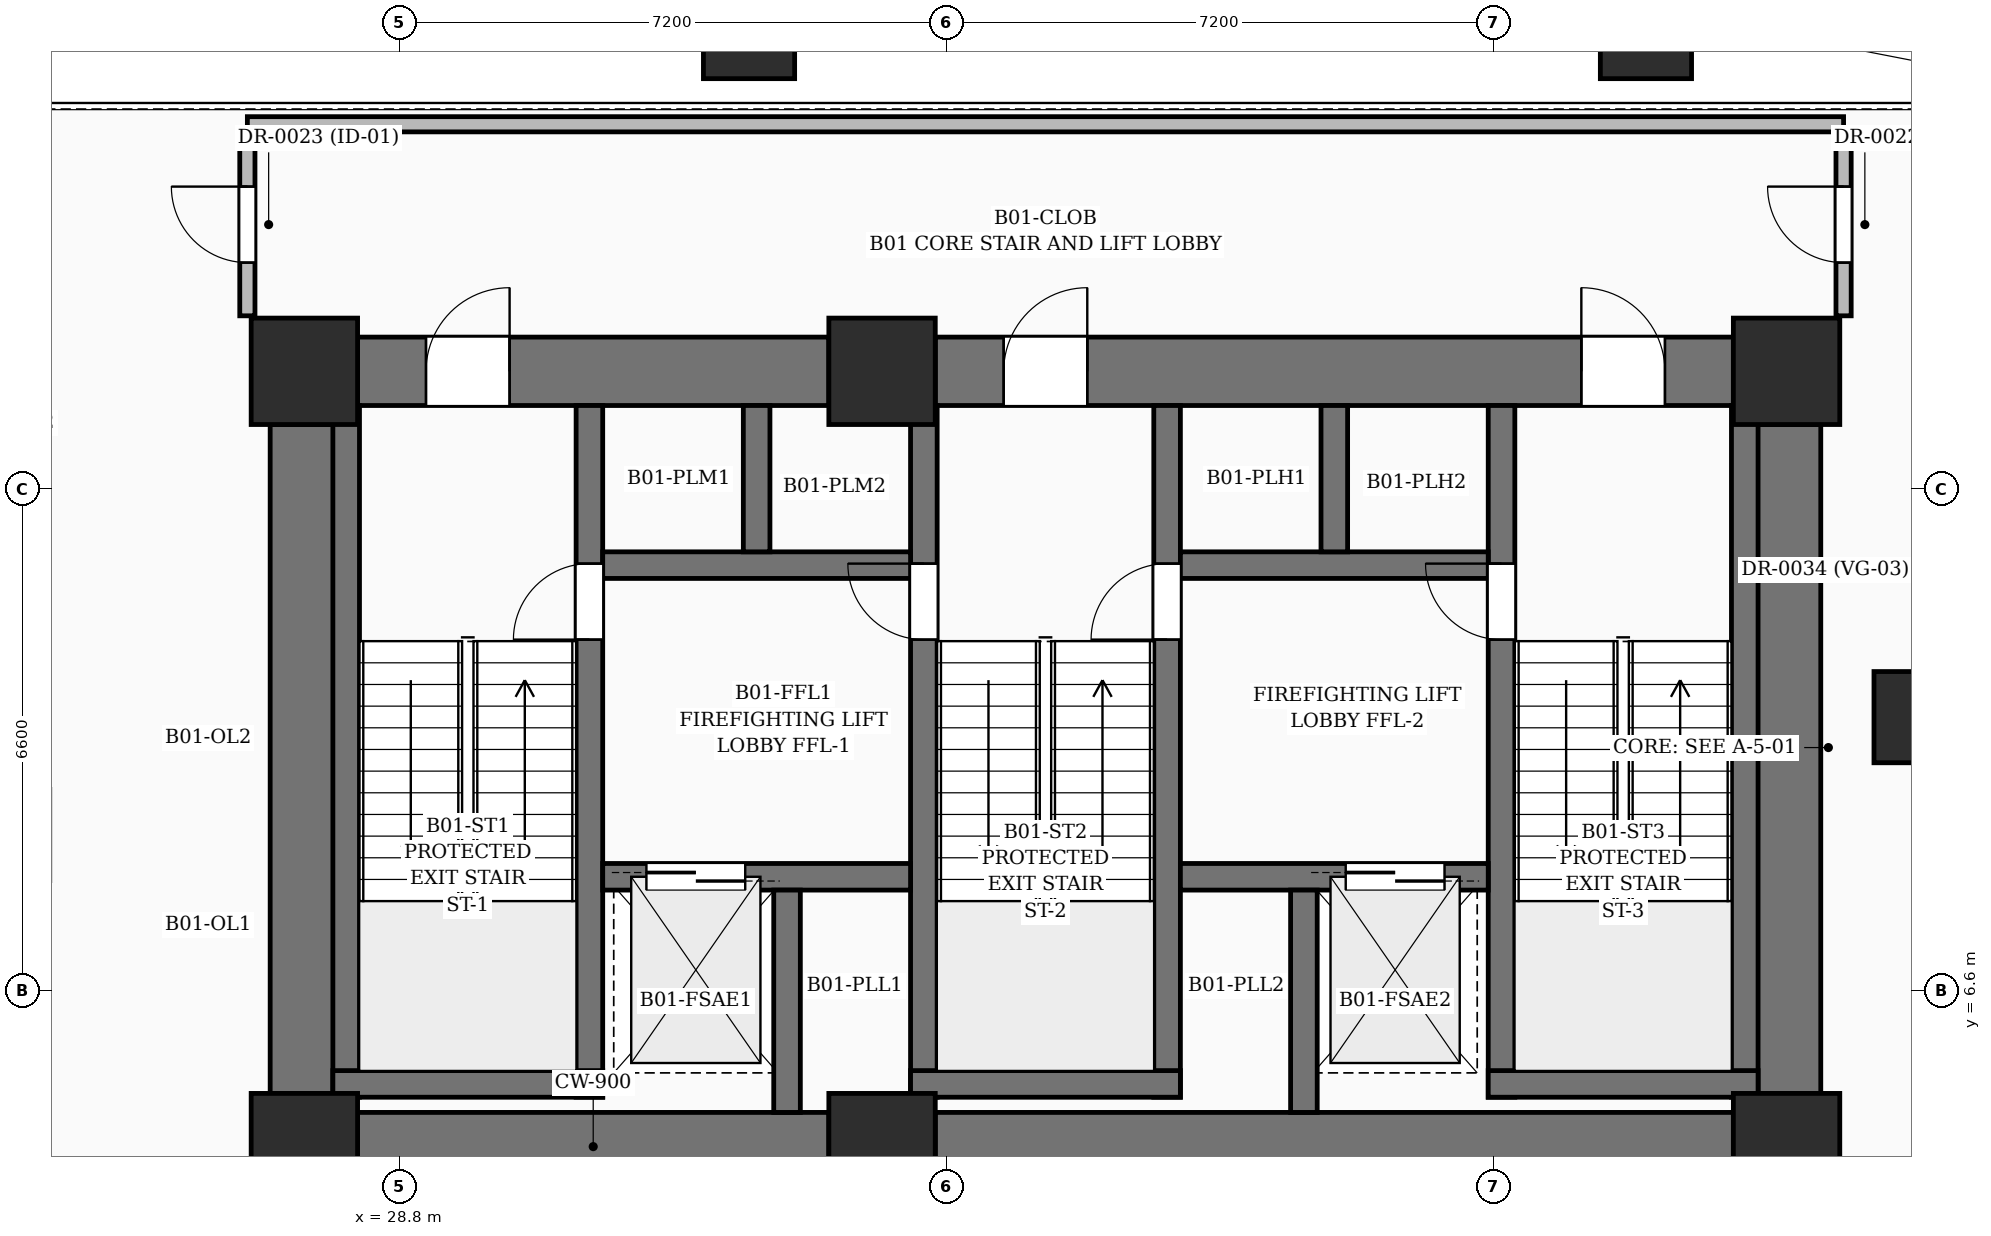
"""IFC4 building model, lengths in metres.
Left out: names, types, materials, properties, quantities, classifications, styles, units other than length and angle.
Written with IfcOpenShell. Run it as: python <this file> out.ifc"""

import sys

from ifc_helpers import new_model, si_unit, direction, frame, frame_2d, origin, origin_2d, place, context, subcontext, project, spatial, rectangle, extrude, element, fill, save


model = new_model("IFC4")
c1 = context("Model", 3, precision=1e-05, world=origin(), true_north=direction((0.0, 1.0)))
c2 = subcontext(c1, "Body", "Model", "MODEL_VIEW")
j1 = project(units=[si_unit("LENGTHUNIT", "METRE"), si_unit("PLANEANGLEUNIT", "RADIAN")], contexts=[c1])
p1 = place(None, origin())
s1 = spatial("IfcSite", under=j1, at=p1, CompositionType="ELEMENT")
p2 = place(p1, origin())
s2 = spatial("IfcBuilding", under=s1, at=p2, CompositionType="ELEMENT")
p3 = place(p2, frame((0.0, 0.0, -4.5)))
s3 = spatial("IfcBuildingStorey", under=s2, at=p3, CompositionType="ELEMENT", Elevation=-4.5)
for number, where, z_axis, x_axis in (
    (1, (27.55, 4.55, 0.0), (0.0, 0.0, 1.0), (1.0, 0.0, 0.0)),
    (2, (35.15, 4.55, 0.0), (0.0, 0.0, 1.0), (1.0, 0.0, 0.0)),
    (3, (47.05, 4.55, 0.0), (0.0, 0.0, 1.0), (1.0, 0.0, 0.0)),
    (4, (27.55, 14.75, 0.0), (0.0, 0.0, 1.0), (1.0, 0.0, 0.0)),
    (5, (35.15, 14.75, 0.0), (0.0, 0.0, 1.0), (1.0, 0.0, 0.0)),
    (6, (47.05, 14.75, 0.0), (0.0, 0.0, 1.0), (1.0, 0.0, 0.0)),
):
    element("IfcColumn", number, at=place(p3, frame(where, z_axis=z_axis, x_axis=x_axis)), inside=s3, PredefinedType="COLUMN", context=c2, shape_type="SweptSolid", body=[
        extrude(rectangle(XDim=1.4, YDim=1.4, at=origin_2d()), origin(), (0.0, 0.0, 1.0), 4.5),
    ])
for number, where, z_axis, x_axis in (
    (7, (48.8, 10.2, 0.0), (0.0, 0.0, 1.0), (1.0, 0.0, 0.0)),
    (8, (45.2, 19.2, 0.0), (0.0, 0.0, 1.0), (1.0, 0.0, 0.0)),
    (9, (33.4, 19.2, 0.0), (0.0, 0.0, 1.0), (1.0, 0.0, 0.0)),
):
    element("IfcColumn", number, at=place(p3, frame(where, z_axis=z_axis, x_axis=x_axis)), inside=s3, PredefinedType="COLUMN", context=c2, shape_type="SweptSolid", body=[
        extrude(rectangle(XDim=1.2, YDim=1.2, at=origin_2d()), origin(), (0.0, 0.0, 1.0), 4.5),
    ])
p4 = place(p3, frame((28.25, 4.55, 0.0), z_axis=(0.0, 0.0, 1.0), x_axis=(1.0, 0.0, 0.0)))
e10 = element("IfcWall", 10, at=p4, inside=s3, PredefinedType="SHEAR", context=c2, shape_type="SweptSolid", body=[
    extrude(rectangle(XDim=6.2, YDim=0.9, at=frame_2d((3.1, 0.0))), origin(), (0.0, 0.0, 1.0), 4.5),
])
p5 = place(p3, frame((35.85, 4.55, 0.0), z_axis=(0.0, 0.0, 1.0), x_axis=(1.0, 0.0, 0.0)))
e11 = element("IfcWall", 11, at=p5, inside=s3, PredefinedType="SHEAR", context=c2, shape_type="SweptSolid", body=[
    extrude(rectangle(XDim=10.5, YDim=0.9, at=frame_2d((5.25, 0.0))), origin(), (0.0, 0.0, 1.0), 4.5),
])
p6 = place(p3, frame((28.25, 14.75, 0.0), z_axis=(0.0, 0.0, 1.0), x_axis=(1.0, 0.0, 0.0)))
e12 = element("IfcWall", 12, at=p6, inside=s3, PredefinedType="SHEAR", context=c2, shape_type="SweptSolid", body=[
    extrude(rectangle(XDim=6.2, YDim=0.9, at=frame_2d((3.1, 0.0))), origin(), (0.0, 0.0, 1.0), 4.5),
])
p7 = place(p6, frame((0.9, 0.0, 0.0)))
e13 = element("IfcOpeningElement", 13, at=p7, cuts=e12, PredefinedType="OPENING", context=c2, shape_type="SweptSolid", body=[
    extrude(rectangle(XDim=1.1, YDim=2.2, at=frame_2d((0.55, 1.1))), frame((0.0, 0.46, 0.0), z_axis=(0.0, -1.0, 0.0), x_axis=(1.0, 0.0, 0.0)), (0.0, 0.0, 1.0), 0.92),
])
p8 = place(p3, frame((35.85, 14.75, 0.0), z_axis=(0.0, 0.0, 1.0), x_axis=(1.0, 0.0, 0.0)))
e14 = element("IfcWall", 14, at=p8, inside=s3, PredefinedType="SHEAR", context=c2, shape_type="SweptSolid", body=[
    extrude(rectangle(XDim=10.5, YDim=0.9, at=frame_2d((5.25, 0.0))), origin(), (0.0, 0.0, 1.0), 4.5),
])
p9 = place(p8, frame((0.9, 0.0, 0.0)))
e15 = element("IfcOpeningElement", 15, at=p9, cuts=e14, PredefinedType="OPENING", context=c2, shape_type="SweptSolid", body=[
    extrude(rectangle(XDim=1.1, YDim=2.2, at=frame_2d((0.55, 1.1))), frame((0.0, 0.46, 0.0), z_axis=(0.0, -1.0, 0.0), x_axis=(1.0, 0.0, 0.0)), (0.0, 0.0, 1.0), 0.92),
])
p10 = place(p8, frame((8.5, 0.0, 0.0)))
e16 = element("IfcOpeningElement", 16, at=p10, cuts=e14, PredefinedType="OPENING", context=c2, shape_type="SweptSolid", body=[
    extrude(rectangle(XDim=1.1, YDim=2.2, at=frame_2d((0.55, 1.1))), frame((0.0, 0.46, 0.0), z_axis=(0.0, -1.0, 0.0), x_axis=(1.0, 0.0, 0.0)), (0.0, 0.0, 1.0), 0.92),
])
for number, where, z_axis, x_axis in (
    (17, (27.55, 5.25, 0.0), (0.0, 0.0, 1.0), (0.0, 1.0, 0.0)),
    (18, (47.05, 5.25, 0.0), (0.0, 0.0, 1.0), (0.0, 1.0, 0.0)),
):
    element("IfcWall", number, at=place(p3, frame(where, z_axis=z_axis, x_axis=x_axis)), inside=s3, PredefinedType="SHEAR", context=c2, shape_type="SweptSolid", body=[
        extrude(rectangle(XDim=8.8, YDim=0.9, at=frame_2d((4.4, 0.0))), origin(), (0.0, 0.0, 1.0), 4.5),
    ])
p11 = place(p3, frame((28.1, 5.2, 0.0), z_axis=(0.0, 0.0, 1.0), x_axis=(0.0, 1.0, 0.0)))
e19 = element("IfcWall", 19, at=p11, inside=s3, PredefinedType="SOLIDWALL", context=c2, shape_type="SweptSolid", body=[
    extrude(rectangle(XDim=9.1, YDim=0.35, at=frame_2d((4.55, 0.0))), origin(), (0.0, 0.0, 1.0), 4.5),
])
p12 = place(p3, frame((31.3, 5.2, 0.0), z_axis=(0.0, 0.0, 1.0), x_axis=(0.0, 1.0, 0.0)))
e20 = element("IfcWall", 20, at=p12, inside=s3, PredefinedType="SOLIDWALL", context=c2, shape_type="SweptSolid", body=[
    extrude(rectangle(XDim=9.1, YDim=0.35, at=frame_2d((4.55, 0.0))), origin(), (0.0, 0.0, 1.0), 4.5),
])
p13 = place(p12, frame((6.02, 0.0, 0.0)))
e21 = element("IfcOpeningElement", 21, at=p13, cuts=e20, PredefinedType="OPENING", context=c2, shape_type="SweptSolid", body=[
    extrude(rectangle(XDim=1.0, YDim=2.15, at=frame_2d((0.5, 1.075))), frame((0.0, 0.185, 0.0), z_axis=(0.0, -1.0, 0.0), x_axis=(1.0, 0.0, 0.0)), (0.0, 0.0, 1.0), 0.37),
])
p14 = place(p3, frame((27.925, 5.375, 0.0), z_axis=(0.0, 0.0, 1.0), x_axis=(1.0, 0.0, 0.0)))
e22 = element("IfcWall", 22, at=p14, inside=s3, PredefinedType="SOLIDWALL", context=c2, shape_type="SweptSolid", body=[
    extrude(rectangle(XDim=3.55, YDim=0.35, at=frame_2d((1.775, 0.0))), origin(), (0.0, 0.0, 1.0), 4.5),
])
p15 = place(p3, frame((35.7, 5.2, 0.0), z_axis=(0.0, 0.0, 1.0), x_axis=(0.0, 1.0, 0.0)))
e23 = element("IfcWall", 23, at=p15, inside=s3, PredefinedType="SOLIDWALL", context=c2, shape_type="SweptSolid", body=[
    extrude(rectangle(XDim=9.1, YDim=0.35, at=frame_2d((4.55, 0.0))), origin(), (0.0, 0.0, 1.0), 4.5),
])
p16 = place(p15, frame((6.02, 0.0, 0.0)))
e24 = element("IfcOpeningElement", 24, at=p16, cuts=e23, PredefinedType="OPENING", context=c2, shape_type="SweptSolid", body=[
    extrude(rectangle(XDim=1.0, YDim=2.15, at=frame_2d((0.5, 1.075))), frame((0.0, 0.185, 0.0), z_axis=(0.0, -1.0, 0.0), x_axis=(1.0, 0.0, 0.0)), (0.0, 0.0, 1.0), 0.37),
])
p17 = place(p3, frame((38.9, 5.2, 0.0), z_axis=(0.0, 0.0, 1.0), x_axis=(0.0, 1.0, 0.0)))
e25 = element("IfcWall", 25, at=p17, inside=s3, PredefinedType="SOLIDWALL", context=c2, shape_type="SweptSolid", body=[
    extrude(rectangle(XDim=9.1, YDim=0.35, at=frame_2d((4.55, 0.0))), origin(), (0.0, 0.0, 1.0), 4.5),
])
p18 = place(p17, frame((6.02, 0.0, 0.0)))
e26 = element("IfcOpeningElement", 26, at=p18, cuts=e25, PredefinedType="OPENING", context=c2, shape_type="SweptSolid", body=[
    extrude(rectangle(XDim=1.0, YDim=2.15, at=frame_2d((0.5, 1.075))), frame((0.0, 0.185, 0.0), z_axis=(0.0, -1.0, 0.0), x_axis=(1.0, 0.0, 0.0)), (0.0, 0.0, 1.0), 0.37),
])
p19 = place(p3, frame((35.525, 5.375, 0.0), z_axis=(0.0, 0.0, 1.0), x_axis=(1.0, 0.0, 0.0)))
e27 = element("IfcWall", 27, at=p19, inside=s3, PredefinedType="SOLIDWALL", context=c2, shape_type="SweptSolid", body=[
    extrude(rectangle(XDim=3.55, YDim=0.35, at=frame_2d((1.775, 0.0))), origin(), (0.0, 0.0, 1.0), 4.5),
])
p20 = place(p3, frame((43.3, 5.2, 0.0), z_axis=(0.0, 0.0, 1.0), x_axis=(0.0, 1.0, 0.0)))
e28 = element("IfcWall", 28, at=p20, inside=s3, PredefinedType="SOLIDWALL", context=c2, shape_type="SweptSolid", body=[
    extrude(rectangle(XDim=9.1, YDim=0.35, at=frame_2d((4.55, 0.0))), origin(), (0.0, 0.0, 1.0), 4.5),
])
p21 = place(p20, frame((6.02, 0.0, 0.0)))
e29 = element("IfcOpeningElement", 29, at=p21, cuts=e28, PredefinedType="OPENING", context=c2, shape_type="SweptSolid", body=[
    extrude(rectangle(XDim=1.0, YDim=2.15, at=frame_2d((0.5, 1.075))), frame((0.0, 0.185, 0.0), z_axis=(0.0, -1.0, 0.0), x_axis=(1.0, 0.0, 0.0)), (0.0, 0.0, 1.0), 0.37),
])
p22 = place(p3, frame((46.5, 5.2, 0.0), z_axis=(0.0, 0.0, 1.0), x_axis=(0.0, 1.0, 0.0)))
e30 = element("IfcWall", 30, at=p22, inside=s3, PredefinedType="SOLIDWALL", context=c2, shape_type="SweptSolid", body=[
    extrude(rectangle(XDim=9.1, YDim=0.35, at=frame_2d((4.55, 0.0))), origin(), (0.0, 0.0, 1.0), 4.5),
])
p23 = place(p3, frame((43.125, 5.375, 0.0), z_axis=(0.0, 0.0, 1.0), x_axis=(1.0, 0.0, 0.0)))
e31 = element("IfcWall", 31, at=p23, inside=s3, PredefinedType="SOLIDWALL", context=c2, shape_type="SweptSolid", body=[
    extrude(rectangle(XDim=3.55, YDim=0.35, at=frame_2d((1.775, 0.0))), origin(), (0.0, 0.0, 1.0), 4.5),
])
p24 = place(p3, frame((31.475, 8.1, 0.0), z_axis=(0.0, 0.0, 1.0), x_axis=(1.0, 0.0, 0.0)))
e32 = element("IfcWall", 32, at=p24, inside=s3, PredefinedType="SOLIDWALL", context=c2, shape_type="SweptSolid", body=[
    extrude(rectangle(XDim=4.05, YDim=0.35, at=frame_2d((2.025, 0.0))), origin(), (0.0, 0.0, 1.0), 4.5),
])
p25 = place(p24, frame((0.575, 0.0, 0.0)))
e33 = element("IfcOpeningElement", 33, at=p25, cuts=e32, PredefinedType="OPENING", context=c2, shape_type="SweptSolid", body=[
    extrude(rectangle(XDim=1.3, YDim=2.25, at=frame_2d((0.65, 1.125))), frame((0.0, 0.185, 0.0), z_axis=(0.0, -1.0, 0.0), x_axis=(1.0, 0.0, 0.0)), (0.0, 0.0, 1.0), 0.37),
])
p26 = place(p3, frame((39.075, 8.1, 0.0), z_axis=(0.0, 0.0, 1.0), x_axis=(1.0, 0.0, 0.0)))
e34 = element("IfcWall", 34, at=p26, inside=s3, PredefinedType="SOLIDWALL", context=c2, shape_type="SweptSolid", body=[
    extrude(rectangle(XDim=4.05, YDim=0.35, at=frame_2d((2.025, 0.0))), origin(), (0.0, 0.0, 1.0), 4.5),
])
p27 = place(p26, frame((2.175, 0.0, 0.0)))
e35 = element("IfcOpeningElement", 35, at=p27, cuts=e34, PredefinedType="OPENING", context=c2, shape_type="SweptSolid", body=[
    extrude(rectangle(XDim=1.3, YDim=2.25, at=frame_2d((0.65, 1.125))), frame((0.0, 0.185, 0.0), z_axis=(0.0, -1.0, 0.0), x_axis=(1.0, 0.0, 0.0)), (0.0, 0.0, 1.0), 0.37),
])
for number, where, z_axis, x_axis in (
    (36, (33.9, 5.0, 0.0), (0.0, 0.0, 1.0), (0.0, 1.0, 0.0)),
    (37, (40.7, 5.0, 0.0), (0.0, 0.0, 1.0), (0.0, 1.0, 0.0)),
):
    element("IfcWall", number, at=place(p3, frame(where, z_axis=z_axis, x_axis=x_axis)), inside=s3, PredefinedType="SOLIDWALL", context=c2, shape_type="SweptSolid", body=[
        extrude(rectangle(XDim=2.925, YDim=0.35, at=frame_2d((1.462, 0.0))), origin(), (0.0, 0.0, 1.0), 4.5),
    ])
p28 = place(p3, frame((31.475, 12.2, 0.0), z_axis=(0.0, 0.0, 1.0), x_axis=(1.0, 0.0, 0.0)))
e38 = element("IfcWall", 38, at=p28, inside=s3, PredefinedType="SOLIDWALL", context=c2, shape_type="SweptSolid", body=[
    extrude(rectangle(XDim=4.05, YDim=0.35, at=frame_2d((2.025, 0.0))), origin(), (0.0, 0.0, 1.0), 4.5),
])
p29 = place(p3, frame((33.5, 12.375, 0.0), z_axis=(0.0, 0.0, 1.0), x_axis=(0.0, 1.0, 0.0)))
e39 = element("IfcWall", 39, at=p29, inside=s3, PredefinedType="SOLIDWALL", context=c2, shape_type="SweptSolid", body=[
    extrude(rectangle(XDim=1.925, YDim=0.35, at=frame_2d((0.962, 0.0))), origin(), (0.0, 0.0, 1.0), 4.5),
])
p30 = place(p3, frame((39.075, 12.2, 0.0), z_axis=(0.0, 0.0, 1.0), x_axis=(1.0, 0.0, 0.0)))
e40 = element("IfcWall", 40, at=p30, inside=s3, PredefinedType="SOLIDWALL", context=c2, shape_type="SweptSolid", body=[
    extrude(rectangle(XDim=4.05, YDim=0.35, at=frame_2d((2.025, 0.0))), origin(), (0.0, 0.0, 1.0), 4.5),
])
p31 = place(p3, frame((41.1, 12.375, 0.0), z_axis=(0.0, 0.0, 1.0), x_axis=(0.0, 1.0, 0.0)))
e41 = element("IfcWall", 41, at=p31, inside=s3, PredefinedType="SOLIDWALL", context=c2, shape_type="SweptSolid", body=[
    extrude(rectangle(XDim=1.925, YDim=0.35, at=frame_2d((0.962, 0.0))), origin(), (0.0, 0.0, 1.0), 4.5),
])
p32 = place(p3, frame((26.8, 18.0, 0.0), z_axis=(0.0, 0.0, 1.0), x_axis=(1.0, 0.0, 0.0)))
e42 = element("IfcWall", 42, at=p32, inside=s3, PredefinedType="PARTITIONING", context=c2, shape_type="SweptSolid", body=[
    extrude(rectangle(XDim=21.0, YDim=0.2, at=frame_2d((10.5, 0.0))), origin(), (0.0, 0.0, 1.0), 4.2),
])
p33 = place(p3, frame((26.8, 15.48, 0.0), z_axis=(0.0, 0.0, 1.0), x_axis=(0.0, 1.0, 0.0)))
e43 = element("IfcWall", 43, at=p33, inside=s3, PredefinedType="PARTITIONING", context=c2, shape_type="SweptSolid", body=[
    extrude(rectangle(XDim=2.41, YDim=0.2, at=frame_2d((1.205, 0.0))), origin(), (0.0, 0.0, 1.0), 4.2),
])
p34 = place(p33, frame((0.7, 0.0, 0.0)))
e44 = element("IfcOpeningElement", 44, at=p34, cuts=e43, PredefinedType="OPENING", context=c2, shape_type="SweptSolid", body=[
    extrude(rectangle(XDim=1.0, YDim=2.2, at=frame_2d((0.5, 1.1))), frame((0.0, 0.11, 0.0), z_axis=(0.0, -1.0, 0.0), x_axis=(1.0, 0.0, 0.0)), (0.0, 0.0, 1.0), 0.22),
])
p35 = place(p3, frame((47.8, 15.48, 0.0), z_axis=(0.0, 0.0, 1.0), x_axis=(0.0, 1.0, 0.0)))
e45 = element("IfcWall", 45, at=p35, inside=s3, PredefinedType="PARTITIONING", context=c2, shape_type="SweptSolid", body=[
    extrude(rectangle(XDim=2.41, YDim=0.2, at=frame_2d((1.205, 0.0))), origin(), (0.0, 0.0, 1.0), 4.2),
])
p36 = place(p35, frame((0.7, 0.0, 0.0)))
e46 = element("IfcOpeningElement", 46, at=p36, cuts=e45, PredefinedType="OPENING", context=c2, shape_type="SweptSolid", body=[
    extrude(rectangle(XDim=1.0, YDim=2.2, at=frame_2d((0.5, 1.1))), frame((0.0, 0.11, 0.0), z_axis=(0.0, -1.0, 0.0), x_axis=(1.0, 0.0, 0.0)), (0.0, 0.0, 1.0), 0.22),
])
p37 = place(p7, origin())
e47 = element("IfcDoor", 47, at=p37, inside=s3, OperationType="SINGLE_SWING_RIGHT", PredefinedType="DOOR", context=c2, shape_type="SweptSolid", body=[
    extrude(rectangle(XDim=1.1, YDim=2.2, at=frame_2d((0.55, 1.1))), frame((0.0, 0.025, 0.0), z_axis=(0.0, -1.0, 0.0), x_axis=(1.0, 0.0, 0.0)), (0.0, 0.0, 1.0), 0.05),
])
fill(e13, e47)
p38 = place(p9, origin())
e48 = element("IfcDoor", 48, at=p38, inside=s3, OperationType="SINGLE_SWING_RIGHT", PredefinedType="DOOR", context=c2, shape_type="SweptSolid", body=[
    extrude(rectangle(XDim=1.1, YDim=2.2, at=frame_2d((0.55, 1.1))), frame((0.0, 0.025, 0.0), z_axis=(0.0, -1.0, 0.0), x_axis=(1.0, 0.0, 0.0)), (0.0, 0.0, 1.0), 0.05),
])
fill(e15, e48)
p39 = place(p10, origin())
e49 = element("IfcDoor", 49, at=p39, inside=s3, OperationType="SINGLE_SWING_LEFT", PredefinedType="DOOR", context=c2, shape_type="SweptSolid", body=[
    extrude(rectangle(XDim=1.1, YDim=2.2, at=frame_2d((0.55, 1.1))), frame((0.0, 0.025, 0.0), z_axis=(0.0, -1.0, 0.0), x_axis=(1.0, 0.0, 0.0)), (0.0, 0.0, 1.0), 0.05),
])
fill(e16, e49)
p40 = place(p13, origin())
e50 = element("IfcDoor", 50, at=p40, inside=s3, OperationType="SINGLE_SWING_LEFT", PredefinedType="DOOR", context=c2, shape_type="SweptSolid", body=[
    extrude(rectangle(XDim=1.0, YDim=2.15, at=frame_2d((0.5, 1.075))), frame((0.0, 0.025, 0.0), z_axis=(0.0, -1.0, 0.0), x_axis=(1.0, 0.0, 0.0)), (0.0, 0.0, 1.0), 0.05),
])
fill(e21, e50)
p41 = place(p16, origin())
e51 = element("IfcDoor", 51, at=p41, inside=s3, OperationType="SINGLE_SWING_RIGHT", PredefinedType="DOOR", context=c2, shape_type="SweptSolid", body=[
    extrude(rectangle(XDim=1.0, YDim=2.15, at=frame_2d((0.5, 1.075))), frame((0.0, 0.025, 0.0), z_axis=(0.0, -1.0, 0.0), x_axis=(1.0, 0.0, 0.0)), (0.0, 0.0, 1.0), 0.05),
])
fill(e24, e51)
p42 = place(p18, origin())
e52 = element("IfcDoor", 52, at=p42, inside=s3, OperationType="SINGLE_SWING_LEFT", PredefinedType="DOOR", context=c2, shape_type="SweptSolid", body=[
    extrude(rectangle(XDim=1.0, YDim=2.15, at=frame_2d((0.5, 1.075))), frame((0.0, 0.025, 0.0), z_axis=(0.0, -1.0, 0.0), x_axis=(1.0, 0.0, 0.0)), (0.0, 0.0, 1.0), 0.05),
])
fill(e26, e52)
p43 = place(p21, origin())
e53 = element("IfcDoor", 53, at=p43, inside=s3, OperationType="SINGLE_SWING_RIGHT", PredefinedType="DOOR", context=c2, shape_type="SweptSolid", body=[
    extrude(rectangle(XDim=1.0, YDim=2.15, at=frame_2d((0.5, 1.075))), frame((0.0, 0.025, 0.0), z_axis=(0.0, -1.0, 0.0), x_axis=(1.0, 0.0, 0.0)), (0.0, 0.0, 1.0), 0.05),
])
fill(e29, e53)
p44 = place(p25, origin())
e54 = element("IfcDoor", 54, at=p44, inside=s3, OperationType="DOUBLE_DOOR_SLIDING", PredefinedType="DOOR", context=c2, shape_type="SweptSolid", body=[
    extrude(rectangle(XDim=1.3, YDim=2.25, at=frame_2d((0.65, 1.125))), frame((0.0, 0.025, 0.0), z_axis=(0.0, -1.0, 0.0), x_axis=(1.0, 0.0, 0.0)), (0.0, 0.0, 1.0), 0.05),
])
fill(e33, e54)
p45 = place(p27, origin())
e55 = element("IfcDoor", 55, at=p45, inside=s3, OperationType="DOUBLE_DOOR_SLIDING", PredefinedType="DOOR", context=c2, shape_type="SweptSolid", body=[
    extrude(rectangle(XDim=1.3, YDim=2.25, at=frame_2d((0.65, 1.125))), frame((0.0, 0.025, 0.0), z_axis=(0.0, -1.0, 0.0), x_axis=(1.0, 0.0, 0.0)), (0.0, 0.0, 1.0), 0.05),
])
fill(e35, e55)
p46 = place(p34, origin())
e56 = element("IfcDoor", 56, at=p46, inside=s3, OperationType="SINGLE_SWING_RIGHT", PredefinedType="DOOR", context=c2, shape_type="SweptSolid", body=[
    extrude(rectangle(XDim=1.0, YDim=2.2, at=frame_2d((0.5, 1.1))), frame((0.0, 0.025, 0.0), z_axis=(0.0, -1.0, 0.0), x_axis=(1.0, 0.0, 0.0)), (0.0, 0.0, 1.0), 0.05),
])
fill(e44, e56)
p47 = place(p36, origin())
e57 = element("IfcDoor", 57, at=p47, inside=s3, OperationType="SINGLE_SWING_RIGHT", PredefinedType="DOOR", context=c2, shape_type="SweptSolid", body=[
    extrude(rectangle(XDim=1.0, YDim=2.2, at=frame_2d((0.5, 1.1))), frame((0.0, 0.025, 0.0), z_axis=(0.0, -1.0, 0.0), x_axis=(1.0, 0.0, 0.0)), (0.0, 0.0, 1.0), 0.05),
])
fill(e46, e57)
save(model, sys.argv[1])
